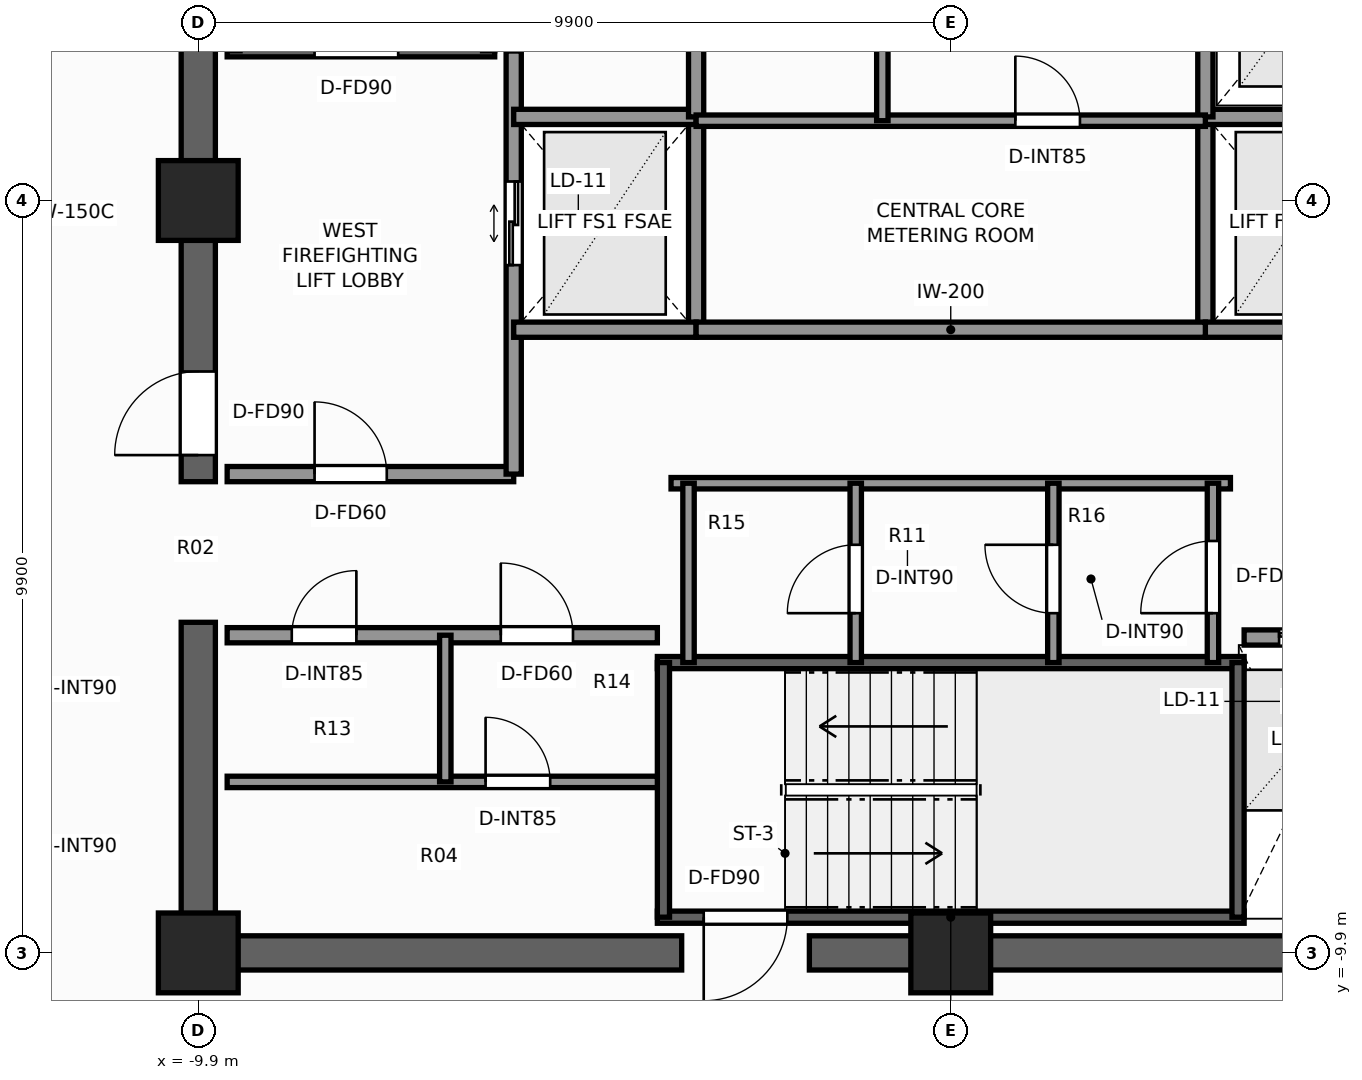
"""IFC4 building model, lengths in metres.
Left out: names, types, materials, properties, quantities, classifications, styles, units other than length and angle.
Written with IfcOpenShell. Run it as: python <this file> out.ifc"""

import sys

from ifc_helpers import new_model, si_unit, direction, frame, frame_2d, origin, origin_2d, place, context, subcontext, project, spatial, rectangle, extrude, element, fill, save


model = new_model("IFC4")
c1 = context("Model", 3, precision=1e-05, world=origin(), true_north=direction((0.0, 1.0)))
c2 = subcontext(c1, "Body", "Model", "MODEL_VIEW")
j1 = project(units=[si_unit("LENGTHUNIT", "METRE"), si_unit("PLANEANGLEUNIT", "RADIAN")], contexts=[c1])
p1 = place(None, origin())
s1 = spatial("IfcSite", under=j1, at=p1, CompositionType="ELEMENT")
p2 = place(p1, origin())
s2 = spatial("IfcBuilding", under=s1, at=p2, CompositionType="ELEMENT")
p3 = place(p2, frame((0.0, 0.0, 222.9)))
s3 = spatial("IfcBuildingStorey", under=s2, at=p3, CompositionType="ELEMENT", Elevation=222.9)
p4 = place(p3, frame((10.125, -9.9, 0.0), z_axis=(0.0, 0.0, 1.0), x_axis=(-1.0, 0.0, 0.0)))
e1 = element("IfcWall", 1, at=p4, inside=s3, PredefinedType="SHEAR", context=c2, shape_type="SweptSolid", body=[
    extrude(rectangle(XDim=11.985, YDim=0.45, at=frame_2d((5.993, 0.0))), origin(), (0.0, 0.0, 1.0), 3.3),
])
p5 = place(p3, frame((-3.54, -9.9, 0.0), z_axis=(0.0, 0.0, 1.0), x_axis=(-1.0, 0.0, 0.0)))
e2 = element("IfcWall", 2, at=p5, inside=s3, PredefinedType="SHEAR", context=c2, shape_type="SweptSolid", body=[
    extrude(rectangle(XDim=6.585, YDim=0.45, at=frame_2d((3.292, 0.0))), origin(), (0.0, 0.0, 1.0), 3.3),
])
p6 = place(p3, frame((-9.9, -9.675, 0.0), z_axis=(0.0, 0.0, 1.0), x_axis=(0.0, 1.0, 0.0)))
e3 = element("IfcWall", 3, at=p6, inside=s3, PredefinedType="SHEAR", context=c2, shape_type="SweptSolid", body=[
    extrude(rectangle(XDim=4.125, YDim=0.45, at=frame_2d((2.062, 0.0))), origin(), (0.0, 0.0, 1.0), 3.3),
])
p7 = place(p3, frame((-9.9, -3.7, 0.0), z_axis=(0.0, 0.0, 1.0), x_axis=(0.0, 1.0, 0.0)))
e4 = element("IfcWall", 4, at=p7, inside=s3, PredefinedType="SHEAR", context=c2, shape_type="SweptSolid", body=[
    extrude(rectangle(XDim=13.375, YDim=0.45, at=frame_2d((6.688, 0.0))), origin(), (0.0, 0.0, 1.0), 3.3),
])
p8 = place(p7, frame((0.35, 0.0, 0.0)))
e5 = element("IfcOpeningElement", 5, at=p8, cuts=e4, PredefinedType="OPENING", context=c2, shape_type="SweptSolid", body=[
    extrude(rectangle(XDim=1.1, YDim=2.2, at=frame_2d((0.55, 1.1))), frame((0.0, 0.235, 0.0), z_axis=(0.0, -1.0, 0.0), x_axis=(1.0, 0.0, 0.0)), (0.0, 0.0, 1.0), 0.47),
])
for number, where, z_axis, x_axis in (
    (6, (-9.9, -9.9, 0.0), (0.0, 0.0, 1.0), (1.0, 0.0, 0.0)),
    (7, (0.0, -9.9, 0.0), (0.0, 0.0, 1.0), (1.0, 0.0, 0.0)),
    (8, (-9.9, 0.0, 0.0), (0.0, 0.0, 1.0), (1.0, 0.0, 0.0)),
):
    element("IfcColumn", number, at=place(p3, frame(where, z_axis=z_axis, x_axis=x_axis)), inside=s3, PredefinedType="COLUMN", context=c2, shape_type="SweptSolid", body=[
        extrude(rectangle(XDim=1.05, YDim=1.05, at=origin_2d()), origin(), (0.0, 0.0, 1.0), 3.3),
    ])
p9 = place(p3, frame((-9.52, 1.97, 0.0), z_axis=(0.0, 0.0, 1.0), x_axis=(1.0, 0.0, 0.0)))
e9 = element("IfcWall", 9, at=p9, inside=s3, PredefinedType="SHEAR", context=c2, shape_type="SweptSolid", body=[
    extrude(rectangle(XDim=3.52, YDim=0.16, at=frame_2d((1.76, 0.0))), origin(), (0.0, 0.0, 1.0), 3.3),
])
p10 = place(p9, frame((1.15, 0.0, 0.0)))
e10 = element("IfcOpeningElement", 10, at=p10, cuts=e9, PredefinedType="OPENING", context=c2, shape_type="SweptSolid", body=[
    extrude(rectangle(XDim=1.1, YDim=2.2, at=frame_2d((0.55, 1.1))), frame((0.0, 0.09, 0.0), z_axis=(0.0, -1.0, 0.0), x_axis=(1.0, 0.0, 0.0)), (0.0, 0.0, 1.0), 0.18),
])
p11 = place(p3, frame((3.86, -9.43, 0.0), z_axis=(0.0, 0.0, 1.0), x_axis=(-1.0, 0.0, 0.0)))
e11 = element("IfcWall", 11, at=p11, inside=s3, PredefinedType="SHEAR", context=c2, shape_type="SweptSolid", body=[
    extrude(rectangle(XDim=7.72, YDim=0.16, at=frame_2d((3.86, 0.0))), origin(), (0.0, 0.0, 1.0), 3.3),
])
p12 = place(p11, frame((6.01, 0.0, 0.0)))
e12 = element("IfcOpeningElement", 12, at=p12, cuts=e11, PredefinedType="OPENING", context=c2, shape_type="SweptSolid", body=[
    extrude(rectangle(XDim=1.1, YDim=2.2, at=frame_2d((0.55, 1.1))), frame((0.0, 0.09, 0.0), z_axis=(0.0, -1.0, 0.0), x_axis=(1.0, 0.0, 0.0)), (0.0, 0.0, 1.0), 0.18),
])
p13 = place(p3, frame((-3.86, -6.08, 0.0), z_axis=(0.0, 0.0, 1.0), x_axis=(1.0, 0.0, 0.0)))
e13 = element("IfcWall", 13, at=p13, inside=s3, PredefinedType="SHEAR", context=c2, shape_type="SweptSolid", body=[
    extrude(rectangle(XDim=7.72, YDim=0.16, at=frame_2d((3.86, 0.0))), origin(), (0.0, 0.0, 1.0), 3.3),
])
for number, where, z_axis, x_axis in (
    (14, (-3.78, -9.43, 0.0), (0.0, 0.0, 1.0), (0.0, 1.0, 0.0)),
    (15, (3.78, -9.43, 0.0), (0.0, 0.0, 1.0), (0.0, 1.0, 0.0)),
):
    element("IfcWall", number, at=place(p3, frame(where, z_axis=z_axis, x_axis=x_axis)), inside=s3, PredefinedType="SHEAR", context=c2, shape_type="SweptSolid", body=[
        extrude(rectangle(XDim=3.35, YDim=0.16, at=frame_2d((1.675, 0.0))), origin(), (0.0, 0.0, 1.0), 3.3),
    ])
p14 = place(p3, frame((-9.52, -3.6, 0.0), z_axis=(0.0, 0.0, 1.0), x_axis=(1.0, 0.0, 0.0)))
e16 = element("IfcWall", 16, at=p14, inside=s3, PredefinedType="SOLIDWALL", context=c2, shape_type="SweptSolid", body=[
    extrude(rectangle(XDim=3.77, YDim=0.2, at=frame_2d((1.885, 0.0))), origin(), (0.0, 0.0, 1.0), 3.08),
])
p15 = place(p14, frame((1.15, 0.0, 0.0)))
e17 = element("IfcOpeningElement", 17, at=p15, cuts=e16, PredefinedType="OPENING", context=c2, shape_type="SweptSolid", body=[
    extrude(rectangle(XDim=0.95, YDim=2.06, at=frame_2d((0.475, 1.03))), frame((0.0, 0.11, 0.0), z_axis=(0.0, -1.0, 0.0), x_axis=(1.0, 0.0, 0.0)), (0.0, 0.0, 1.0), 0.22),
])
p16 = place(p3, frame((-5.75, -3.6, 0.0), z_axis=(0.0, 0.0, 1.0), x_axis=(0.0, 1.0, 0.0)))
e18 = element("IfcWall", 18, at=p16, inside=s3, PredefinedType="SOLIDWALL", context=c2, shape_type="SweptSolid", body=[
    extrude(rectangle(XDim=5.57, YDim=0.2, at=frame_2d((2.785, 0.0))), origin(), (0.0, 0.0, 1.0), 3.08),
])
p17 = place(p16, frame((2.75, 0.0, 0.0)))
e19 = element("IfcOpeningElement", 19, at=p17, cuts=e18, PredefinedType="OPENING", context=c2, shape_type="SweptSolid", body=[
    extrude(rectangle(XDim=1.1, YDim=2.2, at=frame_2d((0.55, 1.1))), frame((0.0, 0.11, 0.0), z_axis=(0.0, -1.0, 0.0), x_axis=(1.0, 0.0, 0.0)), (0.0, 0.0, 1.0), 0.22),
])
p18 = place(p3, frame((-3.35, -1.7, 0.0), z_axis=(0.0, 0.0, 1.0), x_axis=(0.0, 1.0, 0.0)))
e20 = element("IfcWall", 20, at=p18, inside=s3, PredefinedType="SOLIDWALL", context=c2, shape_type="SweptSolid", body=[
    extrude(rectangle(XDim=2.8, YDim=0.2, at=frame_2d((1.4, 0.0))), origin(), (0.0, 0.0, 1.0), 3.08),
])
for number, where, z_axis, x_axis in (
    (21, (-5.75, -1.7, 0.0), (0.0, 0.0, 1.0), (1.0, 0.0, 0.0)),
    (22, (-5.75, 1.1, 0.0), (0.0, 0.0, 1.0), (1.0, 0.0, 0.0)),
):
    element("IfcWall", number, at=place(p3, frame(where, z_axis=z_axis, x_axis=x_axis)), inside=s3, PredefinedType="SOLIDWALL", context=c2, shape_type="SweptSolid", body=[
        extrude(rectangle(XDim=2.4, YDim=0.2, at=frame_2d((1.2, 0.0))), origin(), (0.0, 0.0, 1.0), 3.08),
    ])
p19 = place(p3, frame((3.35, -1.7, 0.0), z_axis=(0.0, 0.0, 1.0), x_axis=(0.0, 1.0, 0.0)))
e23 = element("IfcWall", 23, at=p19, inside=s3, PredefinedType="SOLIDWALL", context=c2, shape_type="SweptSolid", body=[
    extrude(rectangle(XDim=2.8, YDim=0.2, at=frame_2d((1.4, 0.0))), origin(), (0.0, 0.0, 1.0), 3.08),
])
for number, where, z_axis, x_axis in (
    (24, (3.35, -1.7, 0.0), (0.0, 0.0, 1.0), (1.0, 0.0, 0.0)),
    (25, (3.35, 1.1, 0.0), (0.0, 0.0, 1.0), (1.0, 0.0, 0.0)),
):
    element("IfcWall", number, at=place(p3, frame(where, z_axis=z_axis, x_axis=x_axis)), inside=s3, PredefinedType="SOLIDWALL", context=c2, shape_type="SweptSolid", body=[
        extrude(rectangle(XDim=2.4, YDim=0.2, at=frame_2d((1.2, 0.0))), origin(), (0.0, 0.0, 1.0), 3.08),
    ])
p20 = place(p3, frame((-9.52, -5.72, 0.0), z_axis=(0.0, 0.0, 1.0), x_axis=(1.0, 0.0, 0.0)))
e26 = element("IfcWall", 26, at=p20, inside=s3, PredefinedType="SOLIDWALL", context=c2, shape_type="SweptSolid", body=[
    extrude(rectangle(XDim=5.66, YDim=0.2, at=frame_2d((2.83, 0.0))), origin(), (0.0, 0.0, 1.0), 3.08),
])
p21 = place(p20, frame((3.6, 0.0, 0.0)))
e27 = element("IfcOpeningElement", 27, at=p21, cuts=e26, PredefinedType="OPENING", context=c2, shape_type="SweptSolid", body=[
    extrude(rectangle(XDim=0.95, YDim=2.06, at=frame_2d((0.475, 1.03))), frame((0.0, 0.11, 0.0), z_axis=(0.0, -1.0, 0.0), x_axis=(1.0, 0.0, 0.0)), (0.0, 0.0, 1.0), 0.22),
])
p22 = place(p20, frame((0.85, 0.0, 0.0)))
e28 = element("IfcOpeningElement", 28, at=p22, cuts=e26, PredefinedType="OPENING", context=c2, shape_type="SweptSolid", body=[
    extrude(rectangle(XDim=0.85, YDim=2.03, at=frame_2d((0.425, 1.015))), frame((0.0, 0.11, 0.0), z_axis=(0.0, -1.0, 0.0), x_axis=(1.0, 0.0, 0.0)), (0.0, 0.0, 1.0), 0.22),
])
p23 = place(p3, frame((-9.52, -7.65, 0.0), z_axis=(0.0, 0.0, 1.0), x_axis=(1.0, 0.0, 0.0)))
e29 = element("IfcWall", 29, at=p23, inside=s3, PredefinedType="PARTITIONING", context=c2, shape_type="SweptSolid", body=[
    extrude(rectangle(XDim=5.66, YDim=0.15, at=frame_2d((2.83, 0.0))), origin(), (0.0, 0.0, 1.0), 3.08),
])
p24 = place(p23, frame((3.4, 0.0, 0.0)))
e30 = element("IfcOpeningElement", 30, at=p24, cuts=e29, PredefinedType="OPENING", context=c2, shape_type="SweptSolid", body=[
    extrude(rectangle(XDim=0.85, YDim=2.03, at=frame_2d((0.425, 1.015))), frame((0.0, 0.085, 0.0), z_axis=(0.0, -1.0, 0.0), x_axis=(1.0, 0.0, 0.0)), (0.0, 0.0, 1.0), 0.17),
])
p25 = place(p3, frame((-6.65, -7.65, 0.0), z_axis=(0.0, 0.0, 1.0), x_axis=(0.0, 1.0, 0.0)))
e31 = element("IfcWall", 31, at=p25, inside=s3, PredefinedType="PARTITIONING", context=c2, shape_type="SweptSolid", body=[
    extrude(rectangle(XDim=1.93, YDim=0.15, at=frame_2d((0.965, 0.0))), origin(), (0.0, 0.0, 1.0), 3.08),
])
p26 = place(p3, frame((3.86, -5.75, 0.0), z_axis=(0.0, 0.0, 1.0), x_axis=(1.0, 0.0, 0.0)))
e32 = element("IfcWall", 32, at=p26, inside=s3, PredefinedType="SOLIDWALL", context=c2, shape_type="SweptSolid", body=[
    extrude(rectangle(XDim=5.66, YDim=0.2, at=frame_2d((2.83, 0.0))), origin(), (0.0, 0.0, 1.0), 3.08),
])
p27 = place(p26, frame((0.46, 0.0, 0.0)))
e33 = element("IfcOpeningElement", 33, at=p27, cuts=e32, PredefinedType="OPENING", context=c2, shape_type="SweptSolid", body=[
    extrude(rectangle(XDim=1.1, YDim=2.2, at=frame_2d((0.55, 1.1))), frame((0.0, 0.11, 0.0), z_axis=(0.0, -1.0, 0.0), x_axis=(1.0, 0.0, 0.0)), (0.0, 0.0, 1.0), 0.22),
])
p28 = place(p26, frame((2.39, 0.0, 0.0)))
e34 = element("IfcOpeningElement", 34, at=p28, cuts=e32, PredefinedType="OPENING", context=c2, shape_type="SweptSolid", body=[
    extrude(rectangle(XDim=1.1, YDim=2.2, at=frame_2d((0.55, 1.1))), frame((0.0, 0.11, 0.0), z_axis=(0.0, -1.0, 0.0), x_axis=(1.0, 0.0, 0.0)), (0.0, 0.0, 1.0), 0.22),
])
p29 = place(p26, frame((4.32, 0.0, 0.0)))
e35 = element("IfcOpeningElement", 35, at=p29, cuts=e32, PredefinedType="OPENING", context=c2, shape_type="SweptSolid", body=[
    extrude(rectangle(XDim=1.1, YDim=2.2, at=frame_2d((0.55, 1.1))), frame((0.0, 0.11, 0.0), z_axis=(0.0, -1.0, 0.0), x_axis=(1.0, 0.0, 0.0)), (0.0, 0.0, 1.0), 0.22),
])
p30 = place(p3, frame((-3.35, -1.7, 0.0), z_axis=(0.0, 0.0, 1.0), x_axis=(1.0, 0.0, 0.0)))
e36 = element("IfcWall", 36, at=p30, inside=s3, PredefinedType="SOLIDWALL", context=c2, shape_type="SweptSolid", body=[
    extrude(rectangle(XDim=6.7, YDim=0.2, at=frame_2d((3.35, 0.0))), origin(), (0.0, 0.0, 1.0), 3.08),
])
for number, where, z_axis, x_axis in (
    (37, (-3.35, 1.1, 0.0), (0.0, 0.0, 1.0), (0.0, 1.0, 0.0)),
    (38, (3.35, 1.1, 0.0), (0.0, 0.0, 1.0), (0.0, 1.0, 0.0)),
):
    element("IfcWall", number, at=place(p3, frame(where, z_axis=z_axis, x_axis=x_axis)), inside=s3, PredefinedType="SOLIDWALL", context=c2, shape_type="SweptSolid", body=[
        extrude(rectangle(XDim=3.2, YDim=0.2, at=frame_2d((1.6, 0.0))), origin(), (0.0, 0.0, 1.0), 3.08),
    ])
p31 = place(p3, frame((-3.35, 1.05, 0.0), z_axis=(0.0, 0.0, 1.0), x_axis=(1.0, 0.0, 0.0)))
e39 = element("IfcWall", 39, at=p31, inside=s3, PredefinedType="PARTITIONING", context=c2, shape_type="SweptSolid", body=[
    extrude(rectangle(XDim=6.7, YDim=0.15, at=frame_2d((3.35, 0.0))), origin(), (0.0, 0.0, 1.0), 3.08),
])
p32 = place(p31, frame((4.2, 0.0, 0.0)))
e40 = element("IfcOpeningElement", 40, at=p32, cuts=e39, PredefinedType="OPENING", context=c2, shape_type="SweptSolid", body=[
    extrude(rectangle(XDim=0.85, YDim=2.03, at=frame_2d((0.425, 1.015))), frame((0.0, 0.085, 0.0), z_axis=(0.0, -1.0, 0.0), x_axis=(1.0, 0.0, 0.0)), (0.0, 0.0, 1.0), 0.17),
])
p33 = place(p3, frame((-0.9, 1.05, 0.0), z_axis=(0.0, 0.0, 1.0), x_axis=(0.0, 1.0, 0.0)))
e41 = element("IfcWall", 41, at=p33, inside=s3, PredefinedType="PARTITIONING", context=c2, shape_type="SweptSolid", body=[
    extrude(rectangle(XDim=3.25, YDim=0.15, at=frame_2d((1.625, 0.0))), origin(), (0.0, 0.0, 1.0), 3.08),
])
p34 = place(p33, frame((1.1, 0.0, 0.0)))
e42 = element("IfcOpeningElement", 42, at=p34, cuts=e41, PredefinedType="OPENING", context=c2, shape_type="SweptSolid", body=[
    extrude(rectangle(XDim=0.85, YDim=2.03, at=frame_2d((0.425, 1.015))), frame((0.0, 0.085, 0.0), z_axis=(0.0, -1.0, 0.0), x_axis=(1.0, 0.0, 0.0)), (0.0, 0.0, 1.0), 0.17),
])
p35 = place(p3, frame((-3.68, -3.72, 0.0), z_axis=(0.0, 0.0, 1.0), x_axis=(1.0, 0.0, 0.0)))
e43 = element("IfcWall", 43, at=p35, inside=s3, PredefinedType="PARTITIONING", context=c2, shape_type="SweptSolid", body=[
    extrude(rectangle(XDim=7.36, YDim=0.15, at=frame_2d((3.68, 0.0))), origin(), (0.0, 0.0, 1.0), 3.08),
])
p36 = place(p3, frame((3.45, -6.08, 0.0), z_axis=(0.0, 0.0, 1.0), x_axis=(0.0, 1.0, 0.0)))
e44 = element("IfcWall", 44, at=p36, inside=s3, PredefinedType="PARTITIONING", context=c2, shape_type="SweptSolid", body=[
    extrude(rectangle(XDim=2.36, YDim=0.15, at=frame_2d((1.18, 0.0))), origin(), (0.0, 0.0, 1.0), 3.08),
])
p37 = place(p36, frame((0.65, 0.0, 0.0)))
e45 = element("IfcOpeningElement", 45, at=p37, cuts=e44, PredefinedType="OPENING", context=c2, shape_type="SweptSolid", body=[
    extrude(rectangle(XDim=0.95, YDim=2.06, at=frame_2d((0.475, 1.03))), frame((0.0, 0.085, 0.0), z_axis=(0.0, -1.0, 0.0), x_axis=(1.0, 0.0, 0.0)), (0.0, 0.0, 1.0), 0.17),
])
p38 = place(p3, frame((-3.45, -6.08, 0.0), z_axis=(0.0, 0.0, 1.0), x_axis=(0.0, 1.0, 0.0)))
e46 = element("IfcWall", 46, at=p38, inside=s3, PredefinedType="PARTITIONING", context=c2, shape_type="SweptSolid", body=[
    extrude(rectangle(XDim=2.36, YDim=0.15, at=frame_2d((1.18, 0.0))), origin(), (0.0, 0.0, 1.0), 3.08),
])
p39 = place(p3, frame((1.35, -6.08, 0.0), z_axis=(0.0, 0.0, 1.0), x_axis=(0.0, 1.0, 0.0)))
e47 = element("IfcWall", 47, at=p39, inside=s3, PredefinedType="PARTITIONING", context=c2, shape_type="SweptSolid", body=[
    extrude(rectangle(XDim=2.36, YDim=0.15, at=frame_2d((1.18, 0.0))), origin(), (0.0, 0.0, 1.0), 3.08),
])
p40 = place(p39, frame((0.65, 0.0, 0.0)))
e48 = element("IfcOpeningElement", 48, at=p40, cuts=e47, PredefinedType="OPENING", context=c2, shape_type="SweptSolid", body=[
    extrude(rectangle(XDim=0.9, YDim=2.06, at=frame_2d((0.45, 1.03))), frame((0.0, 0.085, 0.0), z_axis=(0.0, -1.0, 0.0), x_axis=(1.0, 0.0, 0.0)), (0.0, 0.0, 1.0), 0.17),
])
p41 = place(p3, frame((-1.25, -6.08, 0.0), z_axis=(0.0, 0.0, 1.0), x_axis=(0.0, 1.0, 0.0)))
e49 = element("IfcWall", 49, at=p41, inside=s3, PredefinedType="PARTITIONING", context=c2, shape_type="SweptSolid", body=[
    extrude(rectangle(XDim=2.36, YDim=0.15, at=frame_2d((1.18, 0.0))), origin(), (0.0, 0.0, 1.0), 3.08),
])
p42 = place(p41, frame((0.65, 0.0, 0.0)))
e50 = element("IfcOpeningElement", 50, at=p42, cuts=e49, PredefinedType="OPENING", context=c2, shape_type="SweptSolid", body=[
    extrude(rectangle(XDim=0.9, YDim=2.06, at=frame_2d((0.45, 1.03))), frame((0.0, 0.085, 0.0), z_axis=(0.0, -1.0, 0.0), x_axis=(1.0, 0.0, 0.0)), (0.0, 0.0, 1.0), 0.17),
])
p43 = place(p10, origin())
e51 = element("IfcDoor", 51, at=p43, inside=s3, OperationType="SINGLE_SWING_LEFT", PredefinedType="DOOR", context=c2, shape_type="SweptSolid", body=[
    extrude(rectangle(XDim=1.1, YDim=2.2, at=frame_2d((0.55, 1.1))), frame((0.0, 0.025, 0.0), z_axis=(0.0, -1.0, 0.0), x_axis=(1.0, 0.0, 0.0)), (0.0, 0.0, 1.0), 0.05),
])
fill(e10, e51)
p44 = place(p12, origin())
e52 = element("IfcDoor", 52, at=p44, inside=s3, OperationType="SINGLE_SWING_RIGHT", PredefinedType="DOOR", context=c2, shape_type="SweptSolid", body=[
    extrude(rectangle(XDim=1.1, YDim=2.2, at=frame_2d((0.55, 1.1))), frame((0.0, 0.025, 0.0), z_axis=(0.0, -1.0, 0.0), x_axis=(1.0, 0.0, 0.0)), (0.0, 0.0, 1.0), 0.05),
])
fill(e12, e52)
p45 = place(p8, origin())
e53 = element("IfcDoor", 53, at=p45, inside=s3, OperationType="SINGLE_SWING_LEFT", PredefinedType="DOOR", context=c2, shape_type="SweptSolid", body=[
    extrude(rectangle(XDim=1.1, YDim=2.2, at=frame_2d((0.55, 1.1))), frame((0.0, 0.025, 0.0), z_axis=(0.0, -1.0, 0.0), x_axis=(1.0, 0.0, 0.0)), (0.0, 0.0, 1.0), 0.05),
])
fill(e5, e53)
p46 = place(p17, origin())
e54 = element("IfcDoor", 54, at=p46, inside=s3, OperationType="DOUBLE_DOOR_SLIDING", PredefinedType="DOOR", context=c2, shape_type="SweptSolid", body=[
    extrude(rectangle(XDim=1.1, YDim=2.2, at=frame_2d((0.55, 1.1))), frame((0.0, 0.025, 0.0), z_axis=(0.0, -1.0, 0.0), x_axis=(1.0, 0.0, 0.0)), (0.0, 0.0, 1.0), 0.05),
])
fill(e19, e54)
p47 = place(p21, origin())
e55 = element("IfcDoor", 55, at=p47, inside=s3, OperationType="SINGLE_SWING_LEFT", PredefinedType="DOOR", context=c2, shape_type="SweptSolid", body=[
    extrude(rectangle(XDim=0.95, YDim=2.06, at=frame_2d((0.475, 1.03))), frame((0.0, 0.025, 0.0), z_axis=(0.0, -1.0, 0.0), x_axis=(1.0, 0.0, 0.0)), (0.0, 0.0, 1.0), 0.05),
])
fill(e27, e55)
p48 = place(p22, origin())
e56 = element("IfcDoor", 56, at=p48, inside=s3, OperationType="SINGLE_SWING_RIGHT", PredefinedType="DOOR", context=c2, shape_type="SweptSolid", body=[
    extrude(rectangle(XDim=0.85, YDim=2.03, at=frame_2d((0.425, 1.015))), frame((0.0, 0.025, 0.0), z_axis=(0.0, -1.0, 0.0), x_axis=(1.0, 0.0, 0.0)), (0.0, 0.0, 1.0), 0.05),
])
fill(e28, e56)
p49 = place(p24, origin())
e57 = element("IfcDoor", 57, at=p49, inside=s3, OperationType="SINGLE_SWING_LEFT", PredefinedType="DOOR", context=c2, shape_type="SweptSolid", body=[
    extrude(rectangle(XDim=0.85, YDim=2.03, at=frame_2d((0.425, 1.015))), frame((0.0, 0.025, 0.0), z_axis=(0.0, -1.0, 0.0), x_axis=(1.0, 0.0, 0.0)), (0.0, 0.0, 1.0), 0.05),
])
fill(e30, e57)
p50 = place(p15, origin())
e58 = element("IfcDoor", 58, at=p50, inside=s3, OperationType="SINGLE_SWING_LEFT", PredefinedType="DOOR", context=c2, shape_type="SweptSolid", body=[
    extrude(rectangle(XDim=0.95, YDim=2.06, at=frame_2d((0.475, 1.03))), frame((0.0, 0.025, 0.0), z_axis=(0.0, -1.0, 0.0), x_axis=(1.0, 0.0, 0.0)), (0.0, 0.0, 1.0), 0.05),
])
fill(e17, e58)
p51 = place(p27, origin())
e59 = element("IfcDoor", 59, at=p51, inside=s3, OperationType="DOUBLE_DOOR_SLIDING", PredefinedType="DOOR", context=c2, shape_type="SweptSolid", body=[
    extrude(rectangle(XDim=1.1, YDim=2.2, at=frame_2d((0.55, 1.1))), frame((0.0, 0.025, 0.0), z_axis=(0.0, -1.0, 0.0), x_axis=(1.0, 0.0, 0.0)), (0.0, 0.0, 1.0), 0.05),
])
fill(e33, e59)
p52 = place(p32, origin())
e60 = element("IfcDoor", 60, at=p52, inside=s3, OperationType="SINGLE_SWING_LEFT", PredefinedType="DOOR", context=c2, shape_type="SweptSolid", body=[
    extrude(rectangle(XDim=0.85, YDim=2.03, at=frame_2d((0.425, 1.015))), frame((0.0, 0.025, 0.0), z_axis=(0.0, -1.0, 0.0), x_axis=(1.0, 0.0, 0.0)), (0.0, 0.0, 1.0), 0.05),
])
fill(e40, e60)
p53 = place(p37, origin())
e61 = element("IfcDoor", 61, at=p53, inside=s3, OperationType="SINGLE_SWING_LEFT", PredefinedType="DOOR", context=c2, shape_type="SweptSolid", body=[
    extrude(rectangle(XDim=0.95, YDim=2.06, at=frame_2d((0.475, 1.03))), frame((0.0, 0.025, 0.0), z_axis=(0.0, -1.0, 0.0), x_axis=(1.0, 0.0, 0.0)), (0.0, 0.0, 1.0), 0.05),
])
fill(e45, e61)
p54 = place(p40, origin())
e62 = element("IfcDoor", 62, at=p54, inside=s3, OperationType="SINGLE_SWING_RIGHT", PredefinedType="DOOR", context=c2, shape_type="SweptSolid", body=[
    extrude(rectangle(XDim=0.9, YDim=2.06, at=frame_2d((0.45, 1.03))), frame((0.0, 0.025, 0.0), z_axis=(0.0, -1.0, 0.0), x_axis=(1.0, 0.0, 0.0)), (0.0, 0.0, 1.0), 0.05),
])
fill(e48, e62)
p55 = place(p42, origin())
e63 = element("IfcDoor", 63, at=p55, inside=s3, OperationType="SINGLE_SWING_LEFT", PredefinedType="DOOR", context=c2, shape_type="SweptSolid", body=[
    extrude(rectangle(XDim=0.9, YDim=2.06, at=frame_2d((0.45, 1.03))), frame((0.0, 0.025, 0.0), z_axis=(0.0, -1.0, 0.0), x_axis=(1.0, 0.0, 0.0)), (0.0, 0.0, 1.0), 0.05),
])
fill(e50, e63)
save(model, sys.argv[1])
